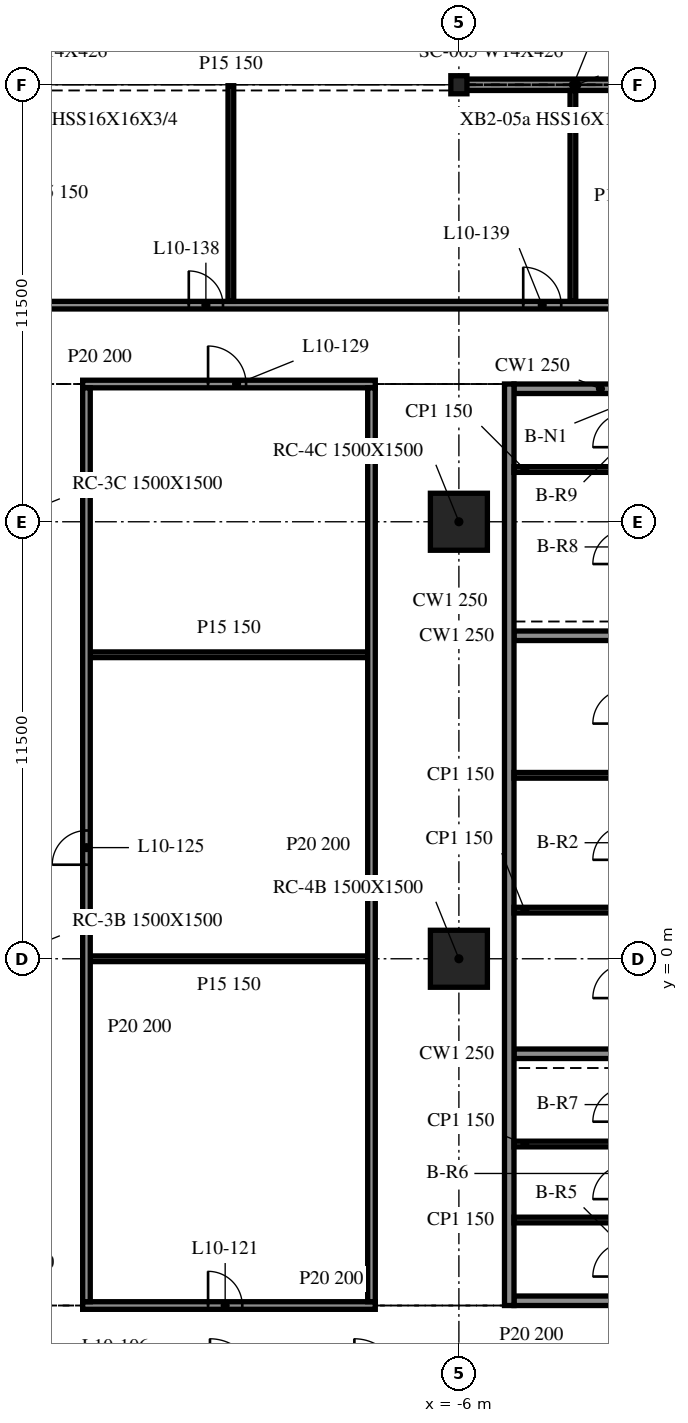
"""IFC4 building model, lengths in metres.
Left out: names, types, materials, properties, quantities, classifications, styles, units other than length and angle.
Written with IfcOpenShell. Run it as: python <this file> out.ifc"""

import sys

from ifc_helpers import new_model, si_unit, direction, frame, frame_2d, origin, origin_2d, place, context, subcontext, project, spatial, rectangle, i_section, extrude, element, fill, save


model = new_model("IFC4")
c1 = context("Model", 3, precision=1e-05, world=origin(), true_north=direction((0.0, 1.0)))
c2 = subcontext(c1, "Body", "Model", "MODEL_VIEW")
j1 = project(units=[si_unit("LENGTHUNIT", "METRE"), si_unit("PLANEANGLEUNIT", "RADIAN")], contexts=[c1])
p1 = place(None, origin())
s1 = spatial("IfcSite", under=j1, at=p1, CompositionType="ELEMENT")
p2 = place(p1, origin())
s2 = spatial("IfcBuilding", under=s1, at=p2, CompositionType="ELEMENT")
p3 = place(p2, frame((0.0, 0.0, 46.0)))
s3 = spatial("IfcBuildingStorey", under=s2, at=p3, CompositionType="ELEMENT", Elevation=46.0)
for number, where, z_axis, x_axis in (
    (1, (-6.0, 0.0, -0.34), (0.0, 0.0, 1.0), (1.0, 0.0, 0.0)),
    (2, (-6.0, 11.5, -0.34), (0.0, 0.0, 1.0), (1.0, 0.0, 0.0)),
):
    element("IfcColumn", number, at=place(p3, frame(where, z_axis=z_axis, x_axis=x_axis)), inside=s3, PredefinedType="COLUMN", context=c2, shape_type="SweptSolid", body=[
        extrude(rectangle(XDim=1.5, YDim=1.5, at=origin_2d()), origin(), (0.0, 0.0, 1.0), 4.3),
    ])
p4 = place(p3, frame((-6.0, 23.0, -0.34), z_axis=(0.0, 0.0, 1.0), x_axis=(1.0, 0.0, 0.0)))
e3 = element("IfcColumn", 3, at=p4, inside=s3, PredefinedType="COLUMN", context=c2, shape_type="SweptSolid", body=[
    extrude(i_section(OverallWidth=0.424, OverallDepth=0.475, WebThickness=0.048, FlangeThickness=0.077, at=origin_2d()), origin(), (0.0, 0.0, 1.0), 4.3),
])
p5 = place(p3, frame((5.976, 23.0, 0.0), z_axis=(0.0, 0.0, 1.0), x_axis=(-1.0, 0.0, 0.0)))
e4 = element("IfcWall", 4, at=p5, inside=s3, PredefinedType="NOTDEFINED", context=c2, shape_type="SweptSolid", body=[
    extrude(rectangle(XDim=11.952, YDim=0.3, at=frame_2d((5.976, 0.0))), origin(), (0.0, 0.0, 1.0), 3.203),
])
p6 = place(p3, frame((-4.675, 15.125, 0.0), z_axis=(0.0, 0.0, 1.0), x_axis=(0.0, -1.0, 0.0)))
e5 = element("IfcWall", 5, at=p6, inside=s3, PredefinedType="SOLIDWALL", context=c2, shape_type="SweptSolid", body=[
    extrude(rectangle(XDim=24.25, YDim=0.25, at=frame_2d((12.125, 0.0))), origin(), (0.0, 0.0, 1.0), 3.96),
])
p7 = place(p3, frame((4.55, -9.0, 0.0), z_axis=(0.0, 0.0, 1.0), x_axis=(-1.0, 0.0, 0.0)))
e6 = element("IfcWall", 6, at=p7, inside=s3, PredefinedType="SOLIDWALL", context=c2, shape_type="SweptSolid", body=[
    extrude(rectangle(XDim=9.1, YDim=0.25, at=frame_2d((4.55, 0.0))), origin(), (0.0, 0.0, 1.0), 3.96),
])
p8 = place(p7, frame((3.65, 0.0, 0.0)))
e7 = element("IfcOpeningElement", 7, at=p8, cuts=e6, PredefinedType="OPENING", context=c2, shape_type="SweptSolid", body=[
    extrude(rectangle(XDim=1.8, YDim=2.1, at=frame_2d((0.9, 1.05))), frame((0.0, 0.135, 0.0), z_axis=(0.0, -1.0, 0.0), x_axis=(1.0, 0.0, 0.0)), (0.0, 0.0, 1.0), 0.27),
])
p9 = place(p3, frame((-4.55, 15.0, 0.0), z_axis=(0.0, 0.0, 1.0), x_axis=(1.0, 0.0, 0.0)))
e8 = element("IfcWall", 8, at=p9, inside=s3, PredefinedType="SOLIDWALL", context=c2, shape_type="SweptSolid", body=[
    extrude(rectangle(XDim=9.1, YDim=0.25, at=frame_2d((4.55, 0.0))), origin(), (0.0, 0.0, 1.0), 3.96),
])
p10 = place(p9, frame((3.65, 0.0, 0.0)))
e9 = element("IfcOpeningElement", 9, at=p10, cuts=e8, PredefinedType="OPENING", context=c2, shape_type="SweptSolid", body=[
    extrude(rectangle(XDim=1.8, YDim=2.1, at=frame_2d((0.9, 1.05))), frame((0.0, 0.135, 0.0), z_axis=(0.0, -1.0, 0.0), x_axis=(1.0, 0.0, 0.0)), (0.0, 0.0, 1.0), 0.27),
])
for number, where, z_axis, x_axis in (
    (10, (-4.55, -2.5, 0.0), (0.0, 0.0, 1.0), (1.0, 0.0, 0.0)),
    (11, (-4.55, 8.5, 0.0), (0.0, 0.0, 1.0), (1.0, 0.0, 0.0)),
):
    element("IfcWall", number, at=place(p3, frame(where, z_axis=z_axis, x_axis=x_axis)), inside=s3, PredefinedType="SOLIDWALL", context=c2, shape_type="SweptSolid", body=[
        extrude(rectangle(XDim=2.85, YDim=0.25, at=frame_2d((1.425, 0.0))), origin(), (0.0, 0.0, 1.0), 3.96),
    ])
for number, where, z_axis, x_axis in (
    (12, (-4.55, 1.28, 0.0), (0.0, 0.0, 1.0), (1.0, 0.0, 0.0)),
    (13, (-4.55, 4.827, 0.0), (0.0, 0.0, 1.0), (1.0, 0.0, 0.0)),
    (14, (-4.55, -6.875, 0.0), (0.0, 0.0, 1.0), (1.0, 0.0, 0.0)),
    (15, (-4.55, -4.875, 0.0), (0.0, 0.0, 1.0), (1.0, 0.0, 0.0)),
    (16, (-4.55, 12.875, 0.0), (0.0, 0.0, 1.0), (1.0, 0.0, 0.0)),
):
    element("IfcWall", number, at=place(p3, frame(where, z_axis=z_axis, x_axis=x_axis)), inside=s3, PredefinedType="PARTITIONING", context=c2, shape_type="SweptSolid", body=[
        extrude(rectangle(XDim=2.85, YDim=0.15, at=frame_2d((1.425, 0.0))), origin(), (0.0, 0.0, 1.0), 3.96),
    ])
p11 = place(p3, frame((-15.9, -9.125, 0.0), z_axis=(0.0, 0.0, 1.0), x_axis=(1.0, 0.0, 0.0)))
e17 = element("IfcWall", 17, at=p11, inside=s3, PredefinedType="PARTITIONING", context=c2, shape_type="SweptSolid", body=[
    extrude(rectangle(XDim=7.7, YDim=0.2, at=frame_2d((3.85, 0.0))), origin(), (0.0, 0.0, 1.0), 3.96),
])
p12 = place(p11, frame((3.3, 0.0, 0.0)))
e18 = element("IfcOpeningElement", 18, at=p12, cuts=e17, PredefinedType="OPENING", context=c2, shape_type="SweptSolid", body=[
    extrude(rectangle(XDim=0.9, YDim=2.1, at=frame_2d((0.45, 1.05))), frame((0.0, 0.11, 0.0), z_axis=(0.0, -1.0, 0.0), x_axis=(1.0, 0.0, 0.0)), (0.0, 0.0, 1.0), 0.22),
])
for number, where, z_axis, x_axis in (
    (19, (-15.7, 0.0, 0.0), (0.0, 0.0, 1.0), (1.0, 0.0, 0.0)),
    (20, (-15.7, 8.0, 0.0), (0.0, 0.0, 1.0), (1.0, 0.0, 0.0)),
):
    element("IfcWall", number, at=place(p3, frame(where, z_axis=z_axis, x_axis=x_axis)), inside=s3, PredefinedType="PARTITIONING", context=c2, shape_type="SweptSolid", body=[
        extrude(rectangle(XDim=7.3, YDim=0.15, at=frame_2d((3.65, 0.0))), origin(), (0.0, 0.0, 1.0), 3.96),
    ])
p13 = place(p3, frame((-15.9, 15.125, 0.0), z_axis=(0.0, 0.0, 1.0), x_axis=(1.0, 0.0, 0.0)))
e21 = element("IfcWall", 21, at=p13, inside=s3, PredefinedType="PARTITIONING", context=c2, shape_type="SweptSolid", body=[
    extrude(rectangle(XDim=7.7, YDim=0.2, at=frame_2d((3.85, 0.0))), origin(), (0.0, 0.0, 1.0), 3.96),
])
p14 = place(p13, frame((3.3, 0.0, 0.0)))
e22 = element("IfcOpeningElement", 22, at=p14, cuts=e21, PredefinedType="OPENING", context=c2, shape_type="SweptSolid", body=[
    extrude(rectangle(XDim=1.0, YDim=2.1, at=frame_2d((0.5, 1.05))), frame((0.0, 0.11, 0.0), z_axis=(0.0, -1.0, 0.0), x_axis=(1.0, 0.0, 0.0)), (0.0, 0.0, 1.0), 0.22),
])
p15 = place(p3, frame((-41.807, 17.2, 0.0), z_axis=(0.0, 0.0, 1.0), x_axis=(1.0, 0.0, 0.0)))
e23 = element("IfcWall", 23, at=p15, inside=s3, PredefinedType="PARTITIONING", context=c2, shape_type="SweptSolid", body=[
    extrude(rectangle(XDim=95.615, YDim=0.2, at=frame_2d((47.807, 0.0))), origin(), (0.0, 0.0, 1.0), 3.96),
])
p16 = place(p15, frame((7.5, 0.0, 0.0)))
e24 = element("IfcOpeningElement", 24, at=p16, cuts=e23, PredefinedType="OPENING", context=c2, shape_type="SweptSolid", body=[
    extrude(rectangle(XDim=1.0, YDim=2.1, at=frame_2d((0.5, 1.05))), frame((0.0, 0.11, 0.0), z_axis=(0.0, -1.0, 0.0), x_axis=(1.0, 0.0, 0.0)), (0.0, 0.0, 1.0), 0.22),
])
p17 = place(p15, frame((10.9, 0.0, 0.0)))
e25 = element("IfcOpeningElement", 25, at=p17, cuts=e23, PredefinedType="OPENING", context=c2, shape_type="SweptSolid", body=[
    extrude(rectangle(XDim=1.0, YDim=2.1, at=frame_2d((0.5, 1.05))), frame((0.0, 0.11, 0.0), z_axis=(0.0, -1.0, 0.0), x_axis=(1.0, 0.0, 0.0)), (0.0, 0.0, 1.0), 0.22),
])
p18 = place(p15, frame((13.7, 0.0, 0.0)))
e26 = element("IfcOpeningElement", 26, at=p18, cuts=e23, PredefinedType="OPENING", context=c2, shape_type="SweptSolid", body=[
    extrude(rectangle(XDim=0.9, YDim=2.1, at=frame_2d((0.45, 1.05))), frame((0.0, 0.11, 0.0), z_axis=(0.0, -1.0, 0.0), x_axis=(1.0, 0.0, 0.0)), (0.0, 0.0, 1.0), 0.22),
])
p19 = place(p15, frame((22.3, 0.0, 0.0)))
e27 = element("IfcOpeningElement", 27, at=p19, cuts=e23, PredefinedType="OPENING", context=c2, shape_type="SweptSolid", body=[
    extrude(rectangle(XDim=1.2, YDim=2.1, at=frame_2d((0.6, 1.05))), frame((0.0, 0.11, 0.0), z_axis=(0.0, -1.0, 0.0), x_axis=(1.0, 0.0, 0.0)), (0.0, 0.0, 1.0), 0.22),
])
p20 = place(p15, frame((28.7, 0.0, 0.0)))
e28 = element("IfcOpeningElement", 28, at=p20, cuts=e23, PredefinedType="OPENING", context=c2, shape_type="SweptSolid", body=[
    extrude(rectangle(XDim=0.9, YDim=2.1, at=frame_2d((0.45, 1.05))), frame((0.0, 0.11, 0.0), z_axis=(0.0, -1.0, 0.0), x_axis=(1.0, 0.0, 0.0)), (0.0, 0.0, 1.0), 0.22),
])
p21 = place(p15, frame((37.5, 0.0, 0.0)))
e29 = element("IfcOpeningElement", 29, at=p21, cuts=e23, PredefinedType="OPENING", context=c2, shape_type="SweptSolid", body=[
    extrude(rectangle(XDim=1.0, YDim=2.1, at=frame_2d((0.5, 1.05))), frame((0.0, 0.11, 0.0), z_axis=(0.0, -1.0, 0.0), x_axis=(1.0, 0.0, 0.0)), (0.0, 0.0, 1.0), 0.22),
])
p22 = place(p15, frame((40.9, 0.0, 0.0)))
e30 = element("IfcOpeningElement", 30, at=p22, cuts=e23, PredefinedType="OPENING", context=c2, shape_type="SweptSolid", body=[
    extrude(rectangle(XDim=1.0, YDim=2.1, at=frame_2d((0.5, 1.05))), frame((0.0, 0.11, 0.0), z_axis=(0.0, -1.0, 0.0), x_axis=(1.0, 0.0, 0.0)), (0.0, 0.0, 1.0), 0.22),
])
p23 = place(p15, frame((43.7, 0.0, 0.0)))
e31 = element("IfcOpeningElement", 31, at=p23, cuts=e23, PredefinedType="OPENING", context=c2, shape_type="SweptSolid", body=[
    extrude(rectangle(XDim=0.9, YDim=2.1, at=frame_2d((0.45, 1.05))), frame((0.0, 0.11, 0.0), z_axis=(0.0, -1.0, 0.0), x_axis=(1.0, 0.0, 0.0)), (0.0, 0.0, 1.0), 0.22),
])
p24 = place(p15, frame((47.3, 0.0, 0.0)))
e32 = element("IfcOpeningElement", 32, at=p24, cuts=e23, PredefinedType="OPENING", context=c2, shape_type="SweptSolid", body=[
    extrude(rectangle(XDim=1.2, YDim=2.1, at=frame_2d((0.6, 1.05))), frame((0.0, 0.11, 0.0), z_axis=(0.0, -1.0, 0.0), x_axis=(1.0, 0.0, 0.0)), (0.0, 0.0, 1.0), 0.22),
])
p25 = place(p15, frame((54.1, 0.0, 0.0)))
e33 = element("IfcOpeningElement", 33, at=p25, cuts=e23, PredefinedType="OPENING", context=c2, shape_type="SweptSolid", body=[
    extrude(rectangle(XDim=0.9, YDim=2.1, at=frame_2d((0.45, 1.05))), frame((0.0, 0.11, 0.0), z_axis=(0.0, -1.0, 0.0), x_axis=(1.0, 0.0, 0.0)), (0.0, 0.0, 1.0), 0.22),
])
p26 = place(p15, frame((60.1, 0.0, 0.0)))
e34 = element("IfcOpeningElement", 34, at=p26, cuts=e23, PredefinedType="OPENING", context=c2, shape_type="SweptSolid", body=[
    extrude(rectangle(XDim=1.0, YDim=2.1, at=frame_2d((0.5, 1.05))), frame((0.0, 0.11, 0.0), z_axis=(0.0, -1.0, 0.0), x_axis=(1.0, 0.0, 0.0)), (0.0, 0.0, 1.0), 0.22),
])
p27 = place(p15, frame((69.1, 0.0, 0.0)))
e35 = element("IfcOpeningElement", 35, at=p27, cuts=e23, PredefinedType="OPENING", context=c2, shape_type="SweptSolid", body=[
    extrude(rectangle(XDim=1.0, YDim=2.1, at=frame_2d((0.5, 1.05))), frame((0.0, 0.11, 0.0), z_axis=(0.0, -1.0, 0.0), x_axis=(1.0, 0.0, 0.0)), (0.0, 0.0, 1.0), 0.22),
])
p28 = place(p15, frame((72.5, 0.0, 0.0)))
e36 = element("IfcOpeningElement", 36, at=p28, cuts=e23, PredefinedType="OPENING", context=c2, shape_type="SweptSolid", body=[
    extrude(rectangle(XDim=0.9, YDim=2.1, at=frame_2d((0.45, 1.05))), frame((0.0, 0.11, 0.0), z_axis=(0.0, -1.0, 0.0), x_axis=(1.0, 0.0, 0.0)), (0.0, 0.0, 1.0), 0.22),
])
p29 = place(p15, frame((75.1, 0.0, 0.0)))
e37 = element("IfcOpeningElement", 37, at=p29, cuts=e23, PredefinedType="OPENING", context=c2, shape_type="SweptSolid", body=[
    extrude(rectangle(XDim=1.2, YDim=2.1, at=frame_2d((0.6, 1.05))), frame((0.0, 0.11, 0.0), z_axis=(0.0, -1.0, 0.0), x_axis=(1.0, 0.0, 0.0)), (0.0, 0.0, 1.0), 0.22),
])
p30 = place(p15, frame((84.1, 0.0, 0.0)))
e38 = element("IfcOpeningElement", 38, at=p30, cuts=e23, PredefinedType="OPENING", context=c2, shape_type="SweptSolid", body=[
    extrude(rectangle(XDim=0.9, YDim=2.1, at=frame_2d((0.45, 1.05))), frame((0.0, 0.11, 0.0), z_axis=(0.0, -1.0, 0.0), x_axis=(1.0, 0.0, 0.0)), (0.0, 0.0, 1.0), 0.22),
])
p31 = place(p15, frame((90.1, 0.0, 0.0)))
e39 = element("IfcOpeningElement", 39, at=p31, cuts=e23, PredefinedType="OPENING", context=c2, shape_type="SweptSolid", body=[
    extrude(rectangle(XDim=1.0, YDim=2.1, at=frame_2d((0.5, 1.05))), frame((0.0, 0.11, 0.0), z_axis=(0.0, -1.0, 0.0), x_axis=(1.0, 0.0, 0.0)), (0.0, 0.0, 1.0), 0.22),
])
p32 = place(p3, frame((-15.8, -9.025, 0.0), z_axis=(0.0, 0.0, 1.0), x_axis=(0.0, 1.0, 0.0)))
e40 = element("IfcWall", 40, at=p32, inside=s3, PredefinedType="PARTITIONING", context=c2, shape_type="SweptSolid", body=[
    extrude(rectangle(XDim=24.05, YDim=0.2, at=frame_2d((12.025, 0.0))), origin(), (0.0, 0.0, 1.0), 3.96),
])
p33 = place(p32, frame((11.5, 0.0, 0.0)))
e41 = element("IfcOpeningElement", 41, at=p33, cuts=e40, PredefinedType="OPENING", context=c2, shape_type="SweptSolid", body=[
    extrude(rectangle(XDim=0.9, YDim=2.1, at=frame_2d((0.45, 1.05))), frame((0.0, 0.11, 0.0), z_axis=(0.0, -1.0, 0.0), x_axis=(1.0, 0.0, 0.0)), (0.0, 0.0, 1.0), 0.22),
])
p34 = place(p3, frame((-12.0, 17.3, 0.0), z_axis=(0.0, 0.0, 1.0), x_axis=(0.0, 1.0, 0.0)))
e42 = element("IfcWall", 42, at=p34, inside=s3, PredefinedType="PARTITIONING", context=c2, shape_type="SweptSolid", body=[
    extrude(rectangle(XDim=5.675, YDim=0.15, at=frame_2d((2.837, 0.0))), origin(), (0.0, 0.0, 1.0), 3.96),
])
p35 = place(p3, frame((-8.3, -9.025, 0.0), z_axis=(0.0, 0.0, 1.0), x_axis=(0.0, 1.0, 0.0)))
e43 = element("IfcWall", 43, at=p35, inside=s3, PredefinedType="PARTITIONING", context=c2, shape_type="SweptSolid", body=[
    extrude(rectangle(XDim=24.05, YDim=0.2, at=frame_2d((12.025, 0.0))), origin(), (0.0, 0.0, 1.0), 3.96),
])
p36 = place(p3, frame((-3.0, 17.3, 0.0), z_axis=(0.0, 0.0, 1.0), x_axis=(0.0, 1.0, 0.0)))
e44 = element("IfcWall", 44, at=p36, inside=s3, PredefinedType="PARTITIONING", context=c2, shape_type="SweptSolid", body=[
    extrude(rectangle(XDim=5.55, YDim=0.15, at=frame_2d((2.775, 0.0))), origin(), (0.0, 0.0, 1.0), 3.96),
])
p37 = place(p12, origin())
e45 = element("IfcDoor", 45, at=p37, inside=s3, OperationType="SINGLE_SWING_LEFT", PredefinedType="DOOR", context=c2, shape_type="SweptSolid", body=[
    extrude(rectangle(XDim=0.9, YDim=2.1, at=frame_2d((0.45, 1.05))), frame((0.0, 0.025, 0.0), z_axis=(0.0, -1.0, 0.0), x_axis=(1.0, 0.0, 0.0)), (0.0, 0.0, 1.0), 0.05),
])
fill(e18, e45)
p38 = place(p33, origin())
e46 = element("IfcDoor", 46, at=p38, inside=s3, OperationType="SINGLE_SWING_RIGHT", PredefinedType="DOOR", context=c2, shape_type="SweptSolid", body=[
    extrude(rectangle(XDim=0.9, YDim=2.1, at=frame_2d((0.45, 1.05))), frame((0.0, 0.025, 0.0), z_axis=(0.0, -1.0, 0.0), x_axis=(1.0, 0.0, 0.0)), (0.0, 0.0, 1.0), 0.05),
])
fill(e41, e46)
p39 = place(p14, origin())
e47 = element("IfcDoor", 47, at=p39, inside=s3, OperationType="SINGLE_SWING_RIGHT", PredefinedType="DOOR", context=c2, shape_type="SweptSolid", body=[
    extrude(rectangle(XDim=1.0, YDim=2.1, at=frame_2d((0.5, 1.05))), frame((0.0, 0.025, 0.0), z_axis=(0.0, -1.0, 0.0), x_axis=(1.0, 0.0, 0.0)), (0.0, 0.0, 1.0), 0.05),
])
fill(e22, e47)
p40 = place(p20, origin())
e48 = element("IfcDoor", 48, at=p40, inside=s3, OperationType="SINGLE_SWING_LEFT", PredefinedType="DOOR", context=c2, shape_type="SweptSolid", body=[
    extrude(rectangle(XDim=0.9, YDim=2.1, at=frame_2d((0.45, 1.05))), frame((0.0, 0.025, 0.0), z_axis=(0.0, -1.0, 0.0), x_axis=(1.0, 0.0, 0.0)), (0.0, 0.0, 1.0), 0.05),
])
fill(e28, e48)
p41 = place(p21, origin())
e49 = element("IfcDoor", 49, at=p41, inside=s3, OperationType="SINGLE_SWING_LEFT", PredefinedType="DOOR", context=c2, shape_type="SweptSolid", body=[
    extrude(rectangle(XDim=1.0, YDim=2.1, at=frame_2d((0.5, 1.05))), frame((0.0, 0.025, 0.0), z_axis=(0.0, -1.0, 0.0), x_axis=(1.0, 0.0, 0.0)), (0.0, 0.0, 1.0), 0.05),
])
fill(e29, e49)
save(model, sys.argv[1])
